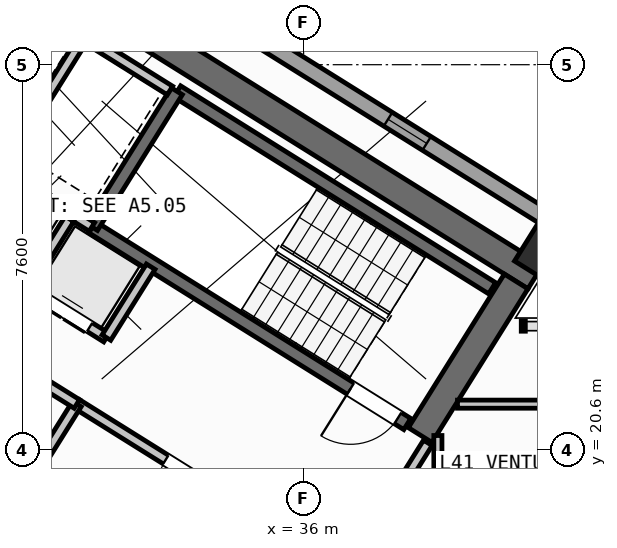
"""IFC4 building model, lengths in metres.
Left out: names, types, materials, properties, quantities, classifications, styles, units other than length and angle.
Written with IfcOpenShell. Run it as: python <this file> out.ifc"""

import sys

from ifc_helpers import new_model, si_unit, direction, frame, frame_2d, origin, origin_2d, place, context, subcontext, project, spatial, rectangle, hollow_rectangle, extrude, source, transform, mapped, element, fill, save


model = new_model("IFC4")
c1 = context("Model", 3, precision=1e-05, world=origin(), true_north=direction((0.0, 1.0)))
c2 = subcontext(c1, "Body", "Model", "MODEL_VIEW")
j1 = project(units=[si_unit("LENGTHUNIT", "METRE"), si_unit("PLANEANGLEUNIT", "RADIAN")], contexts=[c1])
p1 = place(None, origin())
s1 = spatial("IfcSite", under=j1, at=p1, CompositionType="ELEMENT")
p2 = place(p1, origin())
s2 = spatial("IfcBuilding", under=s1, at=p2, CompositionType="ELEMENT")
p3 = place(p2, frame((0.0, 0.0, 162.3)))
s3 = spatial("IfcBuildingStorey", under=s2, at=p3, CompositionType="ELEMENT", Elevation=162.3)
p4 = place(p3, frame((40.573, 24.01, 0.0), z_axis=(0.0, 0.0, 1.0), x_axis=(-0.848047359947, 0.529920442413, 0.0)))
e1 = element("IfcWall", 1, at=p4, inside=s3, PredefinedType="SHEAR", context=c2, shape_type="SweptSolid", body=[
    extrude(rectangle(XDim=13.14, YDim=0.55, at=frame_2d((6.57, 0.0))), origin(), (0.0, 0.0, 1.0), 3.35),
])
p5 = place(p3, frame((40.194, 23.922, 0.0), z_axis=(0.0, 0.0, 1.0), x_axis=(-0.529888438328, -0.848067357541, 0.0)))
e2 = element("IfcWall", 2, at=p5, inside=s3, PredefinedType="SHEAR", context=c2, shape_type="SweptSolid", body=[
    extrude(rectangle(XDim=3.575, YDim=0.55, at=frame_2d((1.788, 0.0))), origin(), (0.0, 0.0, 1.0), 3.35),
])
m1 = source(origin(), c2, "Body", "SweptSolid", [
    extrude(hollow_rectangle(XDim=0.9, YDim=0.9, WallThickness=0.036, at=origin_2d()), origin(), (0.0, 0.0, 1.0), 3.6),
])
p6 = place(p3, frame((40.783, 24.469, 0.0), z_axis=(0.0, 0.0, 1.0), x_axis=(-0.848048096156, 0.529919264233, 0.0)))
e3 = element("IfcColumn", 3, at=p6, inside=s3, PredefinedType="COLUMN", context=c2, shape_type="MappedRepresentation", body=[
    mapped(m1, transform((0.0, 0.0, 0.0), scale=1.0)),
])
p7 = place(p3, frame((14.138, 41.825, 0.0), z_axis=(0.0, 0.0, 1.0), x_axis=(0.848046498049, -0.529921821731, 0.0)))
e4 = element("IfcWall", 4, at=p7, inside=s3, PredefinedType="STANDARD", context=c2, shape_type="SweptSolid", body=[
    extrude(rectangle(XDim=31.588, YDim=0.32, at=frame_2d((15.794, 0.0))), origin(), (0.0, 0.0, 1.0), 3.35),
])
p8 = place(p7, frame((3.253, 0.0, 0.0)))
e5 = element("IfcOpeningElement", 5, at=p8, cuts=e4, PredefinedType="OPENING", context=c2, shape_type="SweptSolid", body=[
    extrude(rectangle(XDim=1.05, YDim=2.15, at=frame_2d((0.525, 1.075))), frame((0.0, 0.17, 0.0), z_axis=(0.0, -1.0, 0.0), x_axis=(1.0, 0.0, 0.0)), (0.0, 0.0, 1.0), 0.34),
])
p9 = place(p7, frame((0.863, 0.0, 0.85)))
e6 = element("IfcOpeningElement", 6, at=p9, cuts=e4, PredefinedType="OPENING", context=c2, shape_type="SweptSolid", body=[
    extrude(rectangle(XDim=1.8, YDim=1.5, at=frame_2d((0.9, 0.75))), frame((0.0, 0.17, 0.0), z_axis=(0.0, -1.0, 0.0), x_axis=(1.0, 0.0, 0.0)), (0.0, 0.0, 1.0), 0.34),
])
p10 = place(p7, frame((8.494, 0.0, 0.85)))
e7 = element("IfcOpeningElement", 7, at=p10, cuts=e4, PredefinedType="OPENING", context=c2, shape_type="SweptSolid", body=[
    extrude(rectangle(XDim=1.8, YDim=1.5, at=frame_2d((0.9, 0.75))), frame((0.0, 0.17, 0.0), z_axis=(0.0, -1.0, 0.0), x_axis=(1.0, 0.0, 0.0)), (0.0, 0.0, 1.0), 0.34),
])
p11 = place(p7, frame((13.874, 0.0, 0.85)))
e8 = element("IfcOpeningElement", 8, at=p11, cuts=e4, PredefinedType="OPENING", context=c2, shape_type="SweptSolid", body=[
    extrude(rectangle(XDim=1.5, YDim=1.5, at=frame_2d((0.75, 0.75))), frame((0.0, 0.17, 0.0), z_axis=(0.0, -1.0, 0.0), x_axis=(1.0, 0.0, 0.0)), (0.0, 0.0, 1.0), 0.34),
])
p12 = place(p7, frame((17.104, 0.0, 1.0)))
e9 = element("IfcOpeningElement", 9, at=p12, cuts=e4, PredefinedType="OPENING", context=c2, shape_type="SweptSolid", body=[
    extrude(rectangle(XDim=0.9, YDim=1.25, at=frame_2d((0.45, 0.625))), frame((0.0, 0.17, 0.0), z_axis=(0.0, -1.0, 0.0), x_axis=(1.0, 0.0, 0.0)), (0.0, 0.0, 1.0), 0.34),
])
p13 = place(p7, frame((22.144, 0.0, 1.0)))
e10 = element("IfcOpeningElement", 10, at=p13, cuts=e4, PredefinedType="OPENING", context=c2, shape_type="SweptSolid", body=[
    extrude(rectangle(XDim=0.9, YDim=1.25, at=frame_2d((0.45, 0.625))), frame((0.0, 0.17, 0.0), z_axis=(0.0, -1.0, 0.0), x_axis=(1.0, 0.0, 0.0)), (0.0, 0.0, 1.0), 0.34),
])
p14 = place(p7, frame((27.744, 0.0, 1.0)))
e11 = element("IfcOpeningElement", 11, at=p14, cuts=e4, PredefinedType="OPENING", context=c2, shape_type="SweptSolid", body=[
    extrude(rectangle(XDim=0.9, YDim=1.25, at=frame_2d((0.45, 0.625))), frame((0.0, 0.17, 0.0), z_axis=(0.0, -1.0, 0.0), x_axis=(1.0, 0.0, 0.0)), (0.0, 0.0, 1.0), 0.34),
])
p15 = place(p3, frame((31.28, 18.261, 0.0), z_axis=(0.0, 0.0, 1.0), x_axis=(-0.848051618787, 0.529913626805, 0.0)))
e12 = element("IfcWall", 12, at=p15, inside=s3, PredefinedType="SHEAR", context=c2, shape_type="SweptSolid", body=[
    extrude(rectangle(XDim=7.46, YDim=0.26, at=frame_2d((3.73, 0.0))), origin(), (0.0, 0.0, 1.0), 3.35),
])
p16 = place(p15, frame((0.36, 0.0, 0.0)))
e13 = element("IfcOpeningElement", 13, at=p16, cuts=e12, PredefinedType="OPENING", context=c2, shape_type="SweptSolid", body=[
    extrude(rectangle(XDim=0.86, YDim=2.05, at=frame_2d((0.43, 1.025))), frame((0.0, 0.14, 0.0), z_axis=(0.0, -1.0, 0.0), x_axis=(1.0, 0.0, 0.0)), (0.0, 0.0, 1.0), 0.28),
])
p17 = place(p3, frame((39.721, 23.788, 0.0), z_axis=(0.0, 0.0, 1.0), x_axis=(-0.848054434086, 0.529909121291, 0.0)))
e14 = element("IfcWall", 14, at=p17, inside=s3, PredefinedType="SHEAR", context=c2, shape_type="SweptSolid", body=[
    extrude(rectangle(XDim=7.33, YDim=0.26, at=frame_2d((3.665, 0.0))), origin(), (0.0, 0.0, 1.0), 3.35),
])
p18 = place(p3, frame((38.046, 21.108, 0.0), z_axis=(0.0, 0.0, 1.0), x_axis=(-0.848054434086, 0.529909121291, 0.0)))
e15 = element("IfcWall", 15, at=p18, inside=s3, PredefinedType="SHEAR", context=c2, shape_type="SweptSolid", body=[
    extrude(rectangle(XDim=7.33, YDim=0.26, at=frame_2d((3.665, 0.0))), origin(), (0.0, 0.0, 1.0), 3.35),
])
p19 = place(p18, frame((0.22, 0.0, 0.0)))
e16 = element("IfcOpeningElement", 16, at=p19, cuts=e15, PredefinedType="OPENING", context=c2, shape_type="SweptSolid", body=[
    extrude(rectangle(XDim=1.1, YDim=2.1, at=frame_2d((0.55, 1.05))), frame((0.0, 0.14, 0.0), z_axis=(0.0, -1.0, 0.0), x_axis=(1.0, 0.0, 0.0)), (0.0, 0.0, 1.0), 0.28),
])
p20 = place(p3, frame((33.496, 27.677, 0.0), z_axis=(0.0, 0.0, 1.0), x_axis=(-0.529908658664, -0.84805472316, 0.0)))
e17 = element("IfcWall", 17, at=p20, inside=s3, PredefinedType="SHEAR", context=c2, shape_type="SweptSolid", body=[
    extrude(rectangle(XDim=3.16, YDim=0.26, at=frame_2d((1.58, 0.0))), origin(), (0.0, 0.0, 1.0), 3.35),
])
p21 = place(p3, frame((36.417, 18.447, 0.0), z_axis=(0.0, 0.0, 1.0), x_axis=(-0.848064879198, 0.529892404805, 0.0)))
e18 = element("IfcWall", 18, at=p21, inside=s3, PredefinedType="STANDARD", context=c2, shape_type="SweptSolid", body=[
    extrude(rectangle(XDim=5.768, YDim=0.2, at=frame_2d((2.884, 0.0))), origin(), (0.0, 0.0, 1.0), 3.34),
])
p22 = place(p21, frame((2.548, 0.0, 0.0)))
e19 = element("IfcOpeningElement", 19, at=p22, cuts=e18, PredefinedType="OPENING", context=c2, shape_type="SweptSolid", body=[
    extrude(rectangle(XDim=1.15, YDim=2.1, at=frame_2d((0.575, 1.05))), frame((0.0, 0.11, 0.0), z_axis=(0.0, -1.0, 0.0), x_axis=(1.0, 0.0, 0.0)), (0.0, 0.0, 1.0), 0.22),
])
p23 = place(p3, frame((31.822, 24.998, 0.0), z_axis=(0.0, 0.0, 1.0), x_axis=(-0.848036912365, 0.52993716162, 0.0)))
e20 = element("IfcWall", 20, at=p23, inside=s3, PredefinedType="STANDARD", context=c2, shape_type="SweptSolid", body=[
    extrude(rectangle(XDim=4.618, YDim=0.2, at=frame_2d((2.309, 0.0))), origin(), (0.0, 0.0, 1.0), 3.34),
])
p24 = place(p3, frame((32.108, 22.814, 0.0), z_axis=(0.0, 0.0, 1.0), x_axis=(-0.848042229521, 0.529928652696, 0.0)))
e21 = element("IfcWall", 21, at=p24, inside=s3, PredefinedType="STANDARD", context=c2, shape_type="SweptSolid", body=[
    extrude(rectangle(XDim=5.62, YDim=0.2, at=frame_2d((2.81, 0.0))), origin(), (0.0, 0.0, 1.0), 3.34),
])
p25 = place(p24, frame((0.39, 0.0, 0.0)))
e22 = element("IfcOpeningElement", 22, at=p25, cuts=e21, PredefinedType="OPENING", context=c2, shape_type="SweptSolid", body=[
    extrude(rectangle(XDim=1.1, YDim=2.15, at=frame_2d((0.55, 1.075))), frame((0.0, 0.11, 0.0), z_axis=(0.0, -1.0, 0.0), x_axis=(1.0, 0.0, 0.0)), (0.0, 0.0, 1.0), 0.22),
])
p26 = place(p24, frame((2.25, 0.0, 0.0)))
e23 = element("IfcOpeningElement", 23, at=p26, cuts=e21, PredefinedType="OPENING", context=c2, shape_type="SweptSolid", body=[
    extrude(rectangle(XDim=1.1, YDim=2.15, at=frame_2d((0.55, 1.075))), frame((0.0, 0.11, 0.0), z_axis=(0.0, -1.0, 0.0), x_axis=(1.0, 0.0, 0.0)), (0.0, 0.0, 1.0), 0.22),
])
p27 = place(p24, frame((4.11, 0.0, 0.0)))
e24 = element("IfcOpeningElement", 24, at=p27, cuts=e21, PredefinedType="OPENING", context=c2, shape_type="SweptSolid", body=[
    extrude(rectangle(XDim=1.1, YDim=2.15, at=frame_2d((0.55, 1.075))), frame((0.0, 0.11, 0.0), z_axis=(0.0, -1.0, 0.0), x_axis=(1.0, 0.0, 0.0)), (0.0, 0.0, 1.0), 0.22),
])
p28 = place(p3, frame((32.982, 24.213, 0.0), z_axis=(0.0, 0.0, 1.0), x_axis=(-0.529839334948, -0.84809803628, 0.0)))
e25 = element("IfcWall", 25, at=p28, inside=s3, PredefinedType="STANDARD", context=c2, shape_type="SweptSolid", body=[
    extrude(rectangle(XDim=1.65, YDim=0.2, at=frame_2d((0.825, 0.0))), origin(), (0.0, 0.0, 1.0), 3.34),
])
p29 = place(p3, frame((31.645, 28.716, 0.0), z_axis=(0.0, 0.0, 1.0), x_axis=(-0.52986693015, -0.848080795876, 0.0)))
e26 = element("IfcWall", 26, at=p29, inside=s3, PredefinedType="STANDARD", context=c2, shape_type="SweptSolid", body=[
    extrude(rectangle(XDim=2.66, YDim=0.2, at=frame_2d((1.33, 0.0))), origin(), (0.0, 0.0, 1.0), 3.34),
])
p30 = place(p3, frame((33.363, 27.69, 0.0), z_axis=(0.0, 0.0, 1.0), x_axis=(-0.848047090064, 0.529920874315, 0.0)))
e27 = element("IfcWall", 27, at=p30, inside=s3, PredefinedType="STANDARD", context=c2, shape_type="SweptSolid", body=[
    extrude(rectangle(XDim=4.498, YDim=0.2, at=frame_2d((2.249, 0.0))), origin(), (0.0, 0.0, 1.0), 3.34),
])
p31 = place(p3, frame((31.379, 25.156, 0.0), z_axis=(0.0, 0.0, 1.0), x_axis=(-0.529998940003, -0.847998304005, 0.0)))
e28 = element("IfcWall", 28, at=p31, inside=s3, PredefinedType="STANDARD", context=c2, shape_type="SweptSolid", body=[
    extrude(rectangle(XDim=1.58, YDim=0.2, at=frame_2d((0.79, 0.0))), origin(), (0.0, 0.0, 1.0), 3.34),
])
p32 = place(p3, frame((31.525, 21.504, 0.0), z_axis=(0.0, 0.0, 1.0), x_axis=(-0.529907497854, -0.848055448493, 0.0)))
e29 = element("IfcWall", 29, at=p32, inside=s3, PredefinedType="STANDARD", context=c2, shape_type="SweptSolid", body=[
    extrude(rectangle(XDim=2.88, YDim=0.2, at=frame_2d((1.44, 0.0))), origin(), (0.0, 0.0, 1.0), 3.34),
])
p33 = place(p3, frame((31.525, 21.504, 0.0), z_axis=(0.0, 0.0, 1.0), x_axis=(-0.848040211232, 0.529931882541, 0.0)))
e30 = element("IfcWall", 30, at=p33, inside=s3, PredefinedType="STANDARD", context=c2, shape_type="SweptSolid", body=[
    extrude(rectangle(XDim=6.218, YDim=0.2, at=frame_2d((3.109, 0.0))), origin(), (0.0, 0.0, 1.0), 3.34),
])
p34 = place(p33, frame((4.4, 0.0, 0.0)))
e31 = element("IfcOpeningElement", 31, at=p34, cuts=e30, PredefinedType="OPENING", context=c2, shape_type="SweptSolid", body=[
    extrude(rectangle(XDim=0.86, YDim=2.05, at=frame_2d((0.43, 1.025))), frame((0.0, 0.11, 0.0), z_axis=(0.0, -1.0, 0.0), x_axis=(1.0, 0.0, 0.0)), (0.0, 0.0, 1.0), 0.22),
])
p35 = place(p33, frame((1.45, 0.0, 0.0)))
e32 = element("IfcOpeningElement", 32, at=p35, cuts=e30, PredefinedType="OPENING", context=c2, shape_type="SweptSolid", body=[
    extrude(rectangle(XDim=0.86, YDim=2.05, at=frame_2d((0.43, 1.025))), frame((0.0, 0.11, 0.0), z_axis=(0.0, -1.0, 0.0), x_axis=(1.0, 0.0, 0.0)), (0.0, 0.0, 1.0), 0.22),
])
p36 = place(p3, frame((38.451, 20.737, 0.0), z_axis=(0.0, 0.0, 1.0), x_axis=(-0.529924799939, -0.848044637038, 0.0)))
e33 = element("IfcWall", 33, at=p36, inside=s3, PredefinedType="STANDARD", context=c2, shape_type="SweptSolid", body=[
    extrude(rectangle(XDim=2.96, YDim=0.2, at=frame_2d((1.48, 0.0))), origin(), (0.0, 0.0, 1.0), 3.34),
])
p37 = place(p36, frame((1.46, 0.0, 0.0)))
e34 = element("IfcOpeningElement", 34, at=p37, cuts=e33, PredefinedType="OPENING", context=c2, shape_type="SweptSolid", body=[
    extrude(rectangle(XDim=0.86, YDim=2.05, at=frame_2d((0.43, 1.025))), frame((0.0, 0.11, 0.0), z_axis=(0.0, -1.0, 0.0), x_axis=(1.0, 0.0, 0.0)), (0.0, 0.0, 1.0), 0.22),
])
p38 = place(p3, frame((38.65, 17.93, 0.0), z_axis=(0.0, 0.0, 1.0), x_axis=(0.0, 1.0, 0.0)))
e35 = element("IfcWall", 35, at=p38, inside=s3, PredefinedType="PARTITIONING", context=c2, shape_type="SweptSolid", body=[
    extrude(rectangle(XDim=2.951, YDim=0.16, at=frame_2d((1.476, 0.0))), origin(), (0.0, 0.0, 1.0), 3.34),
])
p39 = place(p3, frame((39.037, 21.5, 0.0), z_axis=(0.0, 0.0, 1.0), x_axis=(1.0, 0.0, 0.0)))
e36 = element("IfcWall", 36, at=p39, inside=s3, PredefinedType="PARTITIONING", context=c2, shape_type="SweptSolid", body=[
    extrude(rectangle(XDim=7.215, YDim=0.16, at=frame_2d((3.607, 0.0))), origin(), (0.0, 0.0, 1.0), 3.34),
])
m2 = source(origin(), c2, "Body", "SweptSolid", [
    extrude(rectangle(XDim=0.9, YDim=1.25, at=frame_2d((0.45, 0.625))), frame((0.0, 0.03, 0.0), z_axis=(0.0, -1.0, 0.0), x_axis=(1.0, 0.0, 0.0)), (0.0, 0.0, 1.0), 0.06),
])
p40 = place(p14, origin())
e37 = element("IfcWindow", 37, at=p40, inside=s3, PartitioningType="SINGLE_PANEL", PredefinedType="WINDOW", context=c2, shape_type="MappedRepresentation", body=[
    mapped(m2, transform((0.0, 0.0, 0.0), scale=1.0)),
])
fill(e11, e37)
m3 = source(origin(), c2, "Body", "SweptSolid", [
    extrude(rectangle(XDim=1.1, YDim=2.1, at=frame_2d((0.55, 1.05))), frame((0.0, 0.025, 0.0), z_axis=(0.0, -1.0, 0.0), x_axis=(1.0, 0.0, 0.0)), (0.0, 0.0, 1.0), 0.05),
])
p41 = place(p19, origin())
e38 = element("IfcDoor", 38, at=p41, inside=s3, OperationType="SINGLE_SWING_RIGHT", PredefinedType="DOOR", context=c2, shape_type="MappedRepresentation", body=[
    mapped(m3, transform((0.0, 0.0, 0.0), scale=1.0)),
])
fill(e16, e38)
m4 = source(origin(), c2, "Body", "SweptSolid", [
    extrude(rectangle(XDim=1.15, YDim=2.1, at=frame_2d((0.575, 1.05))), frame((0.0, 0.025, 0.0), z_axis=(0.0, -1.0, 0.0), x_axis=(1.0, 0.0, 0.0)), (0.0, 0.0, 1.0), 0.05),
])
p42 = place(p22, origin())
e39 = element("IfcDoor", 39, at=p42, inside=s3, OperationType="SINGLE_SWING_LEFT", PredefinedType="DOOR", context=c2, shape_type="MappedRepresentation", body=[
    mapped(m4, transform((0.0, 0.0, 0.0), scale=1.0)),
])
fill(e19, e39)
m5 = source(origin(), c2, "Body", "SweptSolid", [
    extrude(rectangle(XDim=1.1, YDim=2.15, at=frame_2d((0.55, 1.075))), frame((0.0, 0.025, 0.0), z_axis=(0.0, -1.0, 0.0), x_axis=(1.0, 0.0, 0.0)), (0.0, 0.0, 1.0), 0.05),
])
p43 = place(p25, origin())
e40 = element("IfcDoor", 40, at=p43, inside=s3, OperationType="DOUBLE_DOOR_SLIDING", PredefinedType="DOOR", context=c2, shape_type="MappedRepresentation", body=[
    mapped(m5, transform((0.0, 0.0, 0.0), scale=1.0)),
])
fill(e22, e40)
save(model, sys.argv[1])
